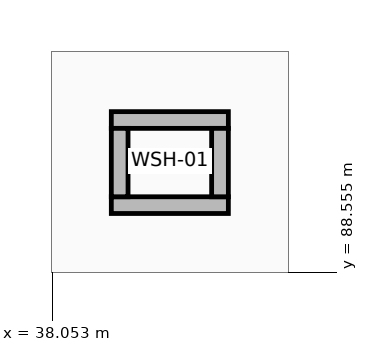
"""IFC4 building model, lengths in metres.
Left out: names, types, materials, properties, quantities, classifications, styles, units other than length and angle.
Written with IfcOpenShell. Run it as: python <this file> out.ifc"""

import sys

from ifc_helpers import new_model, si_unit, direction, frame, frame_2d, origin, place, context, subcontext, project, spatial, rectangle, extrude, element, save


model = new_model("IFC4")
c1 = context("Model", 3, precision=1e-05, world=origin(), true_north=direction((0.0, 1.0)))
c2 = subcontext(c1, "Body", "Model", "MODEL_VIEW")
j1 = project(units=[si_unit("LENGTHUNIT", "METRE"), si_unit("PLANEANGLEUNIT", "RADIAN")], contexts=[c1])
p1 = place(None, origin())
s1 = spatial("IfcSite", under=j1, at=p1, CompositionType="ELEMENT")
p2 = place(p1, origin())
s2 = spatial("IfcBuilding", under=s1, at=p2, CompositionType="ELEMENT")
p3 = place(p2, frame((0.0, 0.0, 18.0)))
s3 = spatial("IfcBuildingStorey", under=s2, at=p3, CompositionType="ELEMENT", Elevation=18.0)
for number, where, z_axis, x_axis in (
    (1, (38.83, 89.44, 0.0), (0.0, 0.0, 1.0), (1.0, 0.0, 0.0)),
    (2, (38.83, 90.56, 0.0), (0.0, 0.0, 1.0), (1.0, 0.0, 0.0)),
):
    element("IfcWall", number, at=place(p3, frame(where, z_axis=z_axis, x_axis=x_axis)), inside=s3, PredefinedType="STANDARD", context=c2, shape_type="SweptSolid", body=[
        extrude(rectangle(XDim=1.54, YDim=0.22, at=frame_2d((0.77, 0.0))), origin(), (0.0, 0.0, 1.0), 3.26),
    ])
for number, where, z_axis, x_axis in (
    (3, (38.94, 89.55, 0.0), (0.0, 0.0, 1.0), (0.0, 1.0, 0.0)),
    (4, (40.26, 89.55, 0.0), (0.0, 0.0, 1.0), (0.0, 1.0, 0.0)),
):
    element("IfcWall", number, at=place(p3, frame(where, z_axis=z_axis, x_axis=x_axis)), inside=s3, PredefinedType="STANDARD", context=c2, shape_type="SweptSolid", body=[
        extrude(rectangle(XDim=0.9, YDim=0.22, at=frame_2d((0.45, 0.0))), origin(), (0.0, 0.0, 1.0), 3.26),
    ])
save(model, sys.argv[1])
